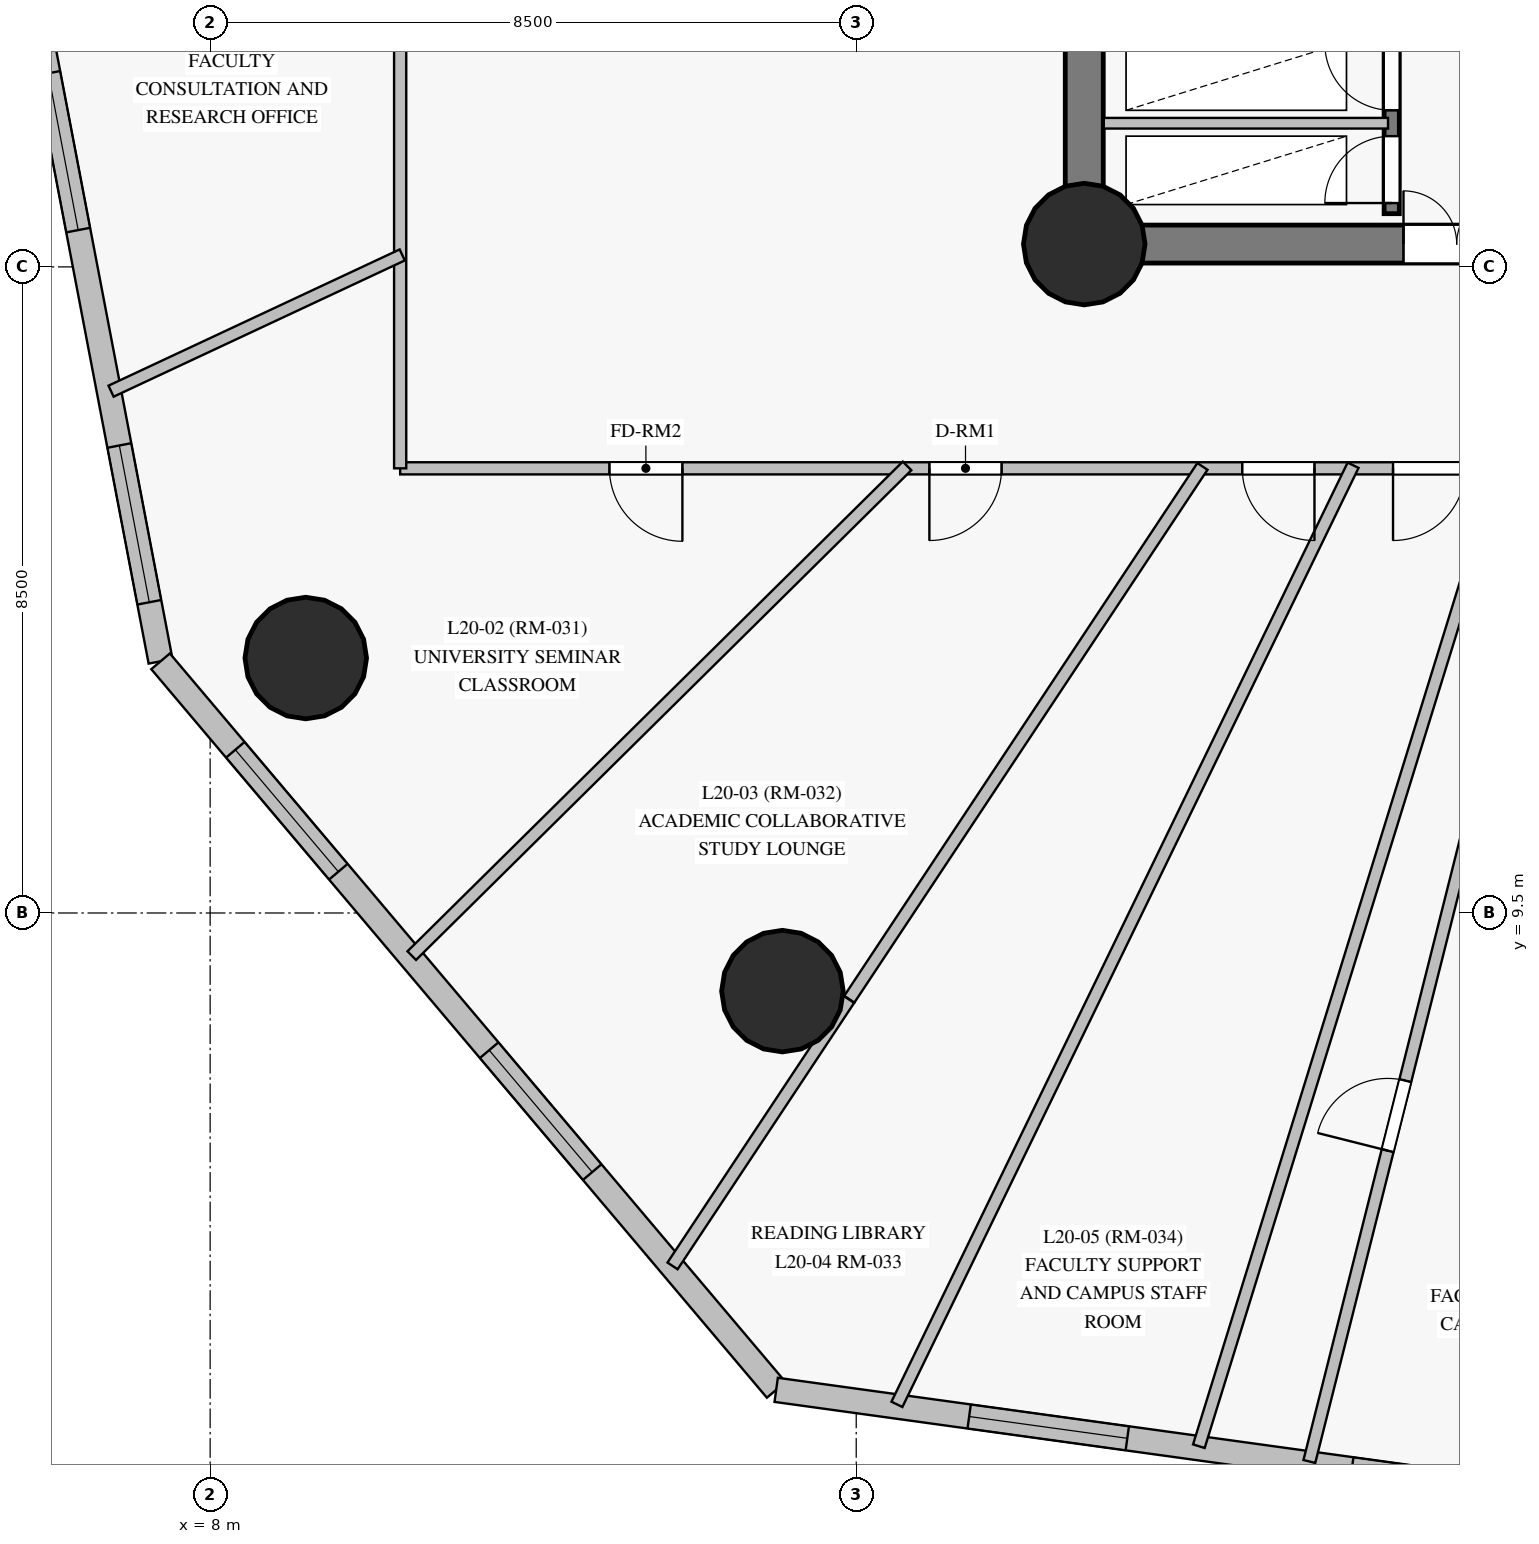
"""IFC4 building model, lengths in metres.
Left out: names, types, materials, properties, quantities, classifications, styles, units other than length and angle.
Written with IfcOpenShell. Run it as: python <this file> out.ifc"""

import sys

from ifc_helpers import new_model, si_unit, direction, frame, frame_2d, origin, origin_with_axes, origin_2d, place, context, subcontext, project, spatial, rectangle, circle, extrude, source, transform, mapped, element, fill, save


model = new_model("IFC4")
c1 = context("Model", 3, precision=1e-05, world=origin(), true_north=direction((0.0, 1.0)))
c2 = subcontext(c1, "Body", "Model", "MODEL_VIEW")
j1 = project(units=[si_unit("LENGTHUNIT", "METRE"), si_unit("PLANEANGLEUNIT", "RADIAN")], contexts=[c1])
p1 = place(None, origin())
s1 = spatial("IfcSite", under=j1, at=p1, CompositionType="ELEMENT")
p2 = place(p1, origin())
s2 = spatial("IfcBuilding", under=s1, at=p2, CompositionType="ELEMENT")
p3 = place(p2, frame((0.0, 0.0, 76.9)))
s3 = spatial("IfcBuildingStorey", under=s2, at=p3, CompositionType="ELEMENT", Elevation=76.9)
p4 = place(p3, frame((19.5, 18.3, 0.0), z_axis=(0.0, 0.0, 1.0), x_axis=(1.0, 0.0, 0.0)))
e1 = element("IfcWall", 1, at=p4, inside=s3, PredefinedType="SHEAR", context=c2, shape_type="SweptSolid", body=[
    extrude(rectangle(XDim=7.05, YDim=0.5, at=frame_2d((3.525, 0.0))), origin(), (0.0, 0.0, 1.0), 3.35),
])
p5 = place(p4, frame((4.2, 0.0, 0.0)))
e2 = element("IfcOpeningElement", 2, at=p5, cuts=e1, PredefinedType="OPENING", context=c2, shape_type="SweptSolid", body=[
    extrude(rectangle(XDim=1.4, YDim=2.2, at=frame_2d((0.7, 1.1))), frame((0.0, 0.26, 0.0), z_axis=(0.0, -1.0, 0.0), x_axis=(1.0, 0.0, 0.0)), (0.0, 0.0, 1.0), 0.52),
])
p6 = place(p3, frame((19.5, 34.7, 0.0), z_axis=(0.0, 0.0, 1.0), x_axis=(0.0, -1.0, 0.0)))
e3 = element("IfcWall", 3, at=p6, inside=s3, PredefinedType="SHEAR", context=c2, shape_type="SweptSolid", body=[
    extrude(rectangle(XDim=16.4, YDim=0.5, at=frame_2d((8.2, 0.0))), origin(), (0.0, 0.0, 1.0), 3.35),
])
p7 = place(p6, frame((3.1, 0.0, 0.0)))
e4 = element("IfcOpeningElement", 4, at=p7, cuts=e3, PredefinedType="OPENING", context=c2, shape_type="SweptSolid", body=[
    extrude(rectangle(XDim=1.1, YDim=2.15, at=frame_2d((0.55, 1.075))), frame((0.0, 0.26, 0.0), z_axis=(0.0, -1.0, 0.0), x_axis=(1.0, 0.0, 0.0)), (0.0, 0.0, 1.0), 0.52),
])
m1 = source(origin_with_axes(), c2, "Body", "SweptSolid", [
    extrude(circle(Radius=0.8, at=origin_2d()), origin(), (0.0, 0.0, 1.0), 3.6),
])
for number, where, z_axis, x_axis in (
    (5, (19.5, 18.3, 0.0), (0.0, 0.0, 1.0), (1.0, 0.0, 0.0)),
    (6, (9.258, 12.854, 0.0), (0.0, 0.0, 1.0), (1.0, 0.0, 0.0)),
    (7, (15.529, 8.472, 0.0), (0.0, 0.0, 1.0), (1.0, 0.0, 0.0)),
):
    element("IfcColumn", number, at=place(p3, frame(where, z_axis=z_axis, x_axis=x_axis)), inside=s3, PredefinedType="COLUMN", context=c2, shape_type="MappedRepresentation", body=[
        mapped(m1, transform((0.0, 0.0, 0.0), scale=1.0)),
    ])
p8 = place(p3, frame((5.454, 22.721, 0.0), z_axis=(0.0, 0.0, 1.0), x_axis=(0.187672475232, -0.982231664141, 0.0)))
e8 = element("IfcWall", 8, at=p8, inside=s3, PredefinedType="SOLIDWALL", context=c2, shape_type="SweptSolid", body=[
    extrude(rectangle(XDim=10.09, YDim=0.32, at=frame_2d((5.045, 0.0))), origin(), (0.0, 0.0, 1.0), 3.35),
])
p9 = place(p8, frame((2.214, 0.0, 0.85)))
e9 = element("IfcOpeningElement", 9, at=p9, cuts=e8, PredefinedType="OPENING", context=c2, shape_type="SweptSolid", body=[
    extrude(rectangle(XDim=2.1, YDim=1.95, at=frame_2d((1.05, 0.975))), frame((0.0, 0.17, 0.0), z_axis=(0.0, -1.0, 0.0), x_axis=(1.0, 0.0, 0.0)), (0.0, 0.0, 1.0), 0.34),
])
p10 = place(p8, frame((7.199, 0.0, 0.85)))
e10 = element("IfcOpeningElement", 10, at=p10, cuts=e8, PredefinedType="OPENING", context=c2, shape_type="SweptSolid", body=[
    extrude(rectangle(XDim=2.1, YDim=1.95, at=frame_2d((1.05, 0.975))), frame((0.0, 0.17, 0.0), z_axis=(0.0, -1.0, 0.0), x_axis=(1.0, 0.0, 0.0)), (0.0, 0.0, 1.0), 0.34),
])
p11 = place(p3, frame((7.348, 12.811, 0.0), z_axis=(0.0, 0.0, 1.0), x_axis=(0.645430137591, -0.76381930945, 0.0)))
e11 = element("IfcWall", 11, at=p11, inside=s3, PredefinedType="SOLIDWALL", context=c2, shape_type="SweptSolid", body=[
    extrude(rectangle(XDim=12.548, YDim=0.32, at=frame_2d((6.274, 0.0))), origin(), (0.0, 0.0, 1.0), 3.35),
])
p12 = place(p11, frame((1.524, 0.0, 0.85)))
e12 = element("IfcOpeningElement", 12, at=p12, cuts=e11, PredefinedType="OPENING", context=c2, shape_type="SweptSolid", body=[
    extrude(rectangle(XDim=2.1, YDim=1.95, at=frame_2d((1.05, 0.975))), frame((0.0, 0.17, 0.0), z_axis=(0.0, -1.0, 0.0), x_axis=(1.0, 0.0, 0.0)), (0.0, 0.0, 1.0), 0.34),
])
p13 = place(p11, frame((6.698, 0.0, 0.85)))
e13 = element("IfcOpeningElement", 13, at=p13, cuts=e11, PredefinedType="OPENING", context=c2, shape_type="SweptSolid", body=[
    extrude(rectangle(XDim=2.1, YDim=1.95, at=frame_2d((1.05, 0.975))), frame((0.0, 0.17, 0.0), z_axis=(0.0, -1.0, 0.0), x_axis=(1.0, 0.0, 0.0)), (0.0, 0.0, 1.0), 0.34),
])
p14 = place(p3, frame((15.447, 3.226, 0.0), z_axis=(0.0, 0.0, 1.0), x_axis=(0.990613318008, -0.136694016636, 0.0)))
e14 = element("IfcWall", 14, at=p14, inside=s3, PredefinedType="SOLIDWALL", context=c2, shape_type="SweptSolid", body=[
    extrude(rectangle(XDim=10.068, YDim=0.32, at=frame_2d((5.034, 0.0))), origin(), (0.0, 0.0, 1.0), 3.35),
])
p15 = place(p14, frame((2.563, 0.0, 0.85)))
e15 = element("IfcOpeningElement", 15, at=p15, cuts=e14, PredefinedType="OPENING", context=c2, shape_type="SweptSolid", body=[
    extrude(rectangle(XDim=2.1, YDim=1.95, at=frame_2d((1.05, 0.975))), frame((0.0, 0.17, 0.0), z_axis=(0.0, -1.0, 0.0), x_axis=(1.0, 0.0, 0.0)), (0.0, 0.0, 1.0), 0.34),
])
p16 = place(p14, frame((7.645, 0.0, 0.85)))
e16 = element("IfcOpeningElement", 16, at=p16, cuts=e14, PredefinedType="OPENING", context=c2, shape_type="SweptSolid", body=[
    extrude(rectangle(XDim=1.8, YDim=1.85, at=frame_2d((0.9, 0.925))), frame((0.0, 0.17, 0.0), z_axis=(0.0, -1.0, 0.0), x_axis=(1.0, 0.0, 0.0)), (0.0, 0.0, 1.0), 0.34),
])
p17 = place(p3, frame((23.545, 18.7, 0.0), z_axis=(0.0, 0.0, 1.0), x_axis=(0.0, 1.0, 0.0)))
e17 = element("IfcWall", 17, at=p17, inside=s3, PredefinedType="SHEAR", context=c2, shape_type="SweptSolid", body=[
    extrude(rectangle(XDim=15.6, YDim=0.2, at=frame_2d((7.8, 0.0))), origin(), (0.0, 0.0, 1.0), 3.35),
])
p18 = place(p17, frame((2.75, 0.0, 0.0)))
e18 = element("IfcOpeningElement", 18, at=p18, cuts=e17, PredefinedType="OPENING", context=c2, shape_type="SweptSolid", body=[
    extrude(rectangle(XDim=1.15, YDim=2.15, at=frame_2d((0.575, 1.075))), frame((0.0, 0.11, 0.0), z_axis=(0.0, -1.0, 0.0), x_axis=(1.0, 0.0, 0.0)), (0.0, 0.0, 1.0), 0.22),
])
p19 = place(p17, frame((0.14, 0.0, 0.0)))
e19 = element("IfcOpeningElement", 19, at=p19, cuts=e17, PredefinedType="OPENING", context=c2, shape_type="SweptSolid", body=[
    extrude(rectangle(XDim=0.88, YDim=2.1, at=frame_2d((0.44, 1.05))), frame((0.0, 0.11, 0.0), z_axis=(0.0, -1.0, 0.0), x_axis=(1.0, 0.0, 0.0)), (0.0, 0.0, 1.0), 0.22),
])
p20 = place(p17, frame((1.36, 0.0, 0.0)))
e20 = element("IfcOpeningElement", 20, at=p20, cuts=e17, PredefinedType="OPENING", context=c2, shape_type="SweptSolid", body=[
    extrude(rectangle(XDim=0.88, YDim=2.1, at=frame_2d((0.44, 1.05))), frame((0.0, 0.11, 0.0), z_axis=(0.0, -1.0, 0.0), x_axis=(1.0, 0.0, 0.0)), (0.0, 0.0, 1.0), 0.22),
])
p21 = place(p17, frame((12.1, 0.0, 0.0)))
e21 = element("IfcOpeningElement", 21, at=p21, cuts=e17, PredefinedType="OPENING", context=c2, shape_type="SweptSolid", body=[
    extrude(rectangle(XDim=1.12, YDim=2.15, at=frame_2d((0.56, 1.075))), frame((0.0, 0.11, 0.0), z_axis=(0.0, -1.0, 0.0), x_axis=(1.0, 0.0, 0.0)), (0.0, 0.0, 1.0), 0.22),
])
p22 = place(p17, frame((14.05, 0.0, 0.0)))
e22 = element("IfcOpeningElement", 22, at=p22, cuts=e17, PredefinedType="OPENING", context=c2, shape_type="SweptSolid", body=[
    extrude(rectangle(XDim=1.12, YDim=2.15, at=frame_2d((0.56, 1.075))), frame((0.0, 0.11, 0.0), z_axis=(0.0, -1.0, 0.0), x_axis=(1.0, 0.0, 0.0)), (0.0, 0.0, 1.0), 0.22),
])
p23 = place(p3, frame((40.25, 15.35, 0.0), z_axis=(0.0, 0.0, 1.0), x_axis=(-1.0, 0.0, 0.0)))
e23 = element("IfcWall", 23, at=p23, inside=s3, PredefinedType="PARTITIONING", context=c2, shape_type="SweptSolid", body=[
    extrude(rectangle(XDim=29.75, YDim=0.16, at=frame_2d((14.875, 0.0))), origin(), (0.0, 0.0, 1.0), 2.7),
])
p24 = place(p23, frame((26.037, 0.0, 0.0)))
e24 = element("IfcOpeningElement", 24, at=p24, cuts=e23, PredefinedType="OPENING", context=c2, shape_type="SweptSolid", body=[
    extrude(rectangle(XDim=0.96, YDim=2.15, at=frame_2d((0.48, 1.075))), frame((0.0, 0.09, 0.0), z_axis=(0.0, -1.0, 0.0), x_axis=(1.0, 0.0, 0.0)), (0.0, 0.0, 1.0), 0.18),
])
p25 = place(p23, frame((21.837, 0.0, 0.0)))
e25 = element("IfcOpeningElement", 25, at=p25, cuts=e23, PredefinedType="OPENING", context=c2, shape_type="SweptSolid", body=[
    extrude(rectangle(XDim=0.95, YDim=2.15, at=frame_2d((0.475, 1.075))), frame((0.0, 0.09, 0.0), z_axis=(0.0, -1.0, 0.0), x_axis=(1.0, 0.0, 0.0)), (0.0, 0.0, 1.0), 0.18),
])
p26 = place(p23, frame((17.721, 0.0, 0.0)))
e26 = element("IfcOpeningElement", 26, at=p26, cuts=e23, PredefinedType="OPENING", context=c2, shape_type="SweptSolid", body=[
    extrude(rectangle(XDim=0.95, YDim=2.15, at=frame_2d((0.475, 1.075))), frame((0.0, 0.09, 0.0), z_axis=(0.0, -1.0, 0.0), x_axis=(1.0, 0.0, 0.0)), (0.0, 0.0, 1.0), 0.18),
])
p27 = place(p23, frame((15.738, 0.0, 0.0)))
e27 = element("IfcOpeningElement", 27, at=p27, cuts=e23, PredefinedType="OPENING", context=c2, shape_type="SweptSolid", body=[
    extrude(rectangle(XDim=0.95, YDim=2.15, at=frame_2d((0.475, 1.075))), frame((0.0, 0.09, 0.0), z_axis=(0.0, -1.0, 0.0), x_axis=(1.0, 0.0, 0.0)), (0.0, 0.0, 1.0), 0.18),
])
p28 = place(p23, frame((14.06, 0.0, 0.0)))
e28 = element("IfcOpeningElement", 28, at=p28, cuts=e23, PredefinedType="OPENING", context=c2, shape_type="SweptSolid", body=[
    extrude(rectangle(XDim=0.95, YDim=2.15, at=frame_2d((0.475, 1.075))), frame((0.0, 0.09, 0.0), z_axis=(0.0, -1.0, 0.0), x_axis=(1.0, 0.0, 0.0)), (0.0, 0.0, 1.0), 0.18),
])
p29 = place(p23, frame((2.16, 0.0, 0.0)))
e29 = element("IfcOpeningElement", 29, at=p29, cuts=e23, PredefinedType="OPENING", context=c2, shape_type="SweptSolid", body=[
    extrude(rectangle(XDim=0.95, YDim=2.15, at=frame_2d((0.475, 1.075))), frame((0.0, 0.09, 0.0), z_axis=(0.0, -1.0, 0.0), x_axis=(1.0, 0.0, 0.0)), (0.0, 0.0, 1.0), 0.18),
])
p30 = place(p3, frame((10.5, 15.35, 0.0), z_axis=(0.0, 0.0, 1.0), x_axis=(0.0, 1.0, 0.0)))
e30 = element("IfcWall", 30, at=p30, inside=s3, PredefinedType="PARTITIONING", context=c2, shape_type="SweptSolid", body=[
    extrude(rectangle(XDim=22.3, YDim=0.16, at=frame_2d((11.15, 0.0))), origin(), (0.0, 0.0, 1.0), 2.75),
])
p31 = place(p30, frame((7.33, 0.0, 0.0)))
e31 = element("IfcOpeningElement", 31, at=p31, cuts=e30, PredefinedType="OPENING", context=c2, shape_type="SweptSolid", body=[
    extrude(rectangle(XDim=0.95, YDim=2.15, at=frame_2d((0.475, 1.075))), frame((0.0, 0.09, 0.0), z_axis=(0.0, -1.0, 0.0), x_axis=(1.0, 0.0, 0.0)), (0.0, 0.0, 1.0), 0.18),
])
p32 = place(p30, frame((10.675, 0.0, 0.0)))
e32 = element("IfcOpeningElement", 32, at=p32, cuts=e30, PredefinedType="OPENING", context=c2, shape_type="SweptSolid", body=[
    extrude(rectangle(XDim=0.95, YDim=2.15, at=frame_2d((0.475, 1.075))), frame((0.0, 0.09, 0.0), z_axis=(0.0, -1.0, 0.0), x_axis=(1.0, 0.0, 0.0)), (0.0, 0.0, 1.0), 0.18),
])
p33 = place(p3, frame((23.037, 15.39, 0.0), z_axis=(0.0, 0.0, 1.0), x_axis=(-0.436938889673, -0.899491193226, 0.0)))
e33 = element("IfcWall", 33, at=p33, inside=s3, PredefinedType="PARTITIONING", context=c2, shape_type="SweptSolid", body=[
    extrude(rectangle(XDim=13.735, YDim=0.16, at=frame_2d((6.868, 0.0))), origin(), (0.0, 0.0, 1.0), 3.35),
])
p34 = place(p3, frame((25.001, 15.393, 0.0), z_axis=(0.0, 0.0, 1.0), x_axis=(-0.29553806887, -0.955330963514, 0.0)))
e34 = element("IfcWall", 34, at=p34, inside=s3, PredefinedType="PARTITIONING", context=c2, shape_type="SweptSolid", body=[
    extrude(rectangle(XDim=13.511, YDim=0.16, at=frame_2d((6.756, 0.0))), origin(), (0.0, 0.0, 1.0), 3.35),
])
p35 = place(p3, frame((22.461, 2.284, 0.0), z_axis=(0.0, 0.0, 1.0), x_axis=(0.244291469889, 0.969701849921, 0.0)))
e35 = element("IfcWall", 35, at=p35, inside=s3, PredefinedType="PARTITIONING", context=c2, shape_type="SweptSolid", body=[
    extrude(rectangle(XDim=9.42, YDim=0.16, at=frame_2d((4.71, 0.0))), origin(), (0.0, 0.0, 1.0), 3.35),
])
p36 = place(p35, frame((4.218, 0.0, 0.0)))
e36 = element("IfcOpeningElement", 36, at=p36, cuts=e35, PredefinedType="OPENING", context=c2, shape_type="SweptSolid", body=[
    extrude(rectangle(XDim=0.95, YDim=2.15, at=frame_2d((0.475, 1.075))), frame((0.0, 0.09, 0.0), z_axis=(0.0, -1.0, 0.0), x_axis=(1.0, 0.0, 0.0)), (0.0, 0.0, 1.0), 0.18),
])
p37 = place(p3, frame((17.169, 15.382, 0.0), z_axis=(0.0, 0.0, 1.0), x_axis=(-0.711131694036, -0.703058826654, 0.0)))
e37 = element("IfcWall", 37, at=p37, inside=s3, PredefinedType="PARTITIONING", context=c2, shape_type="SweptSolid", body=[
    extrude(rectangle(XDim=9.163, YDim=0.16, at=frame_2d((4.582, 0.0))), origin(), (0.0, 0.0, 1.0), 3.35),
])
p38 = place(p3, frame((21.055, 15.375, 0.0), z_axis=(0.0, 0.0, 1.0), x_axis=(-0.552453765645, -0.833543542248, 0.0)))
e38 = element("IfcWall", 38, at=p38, inside=s3, PredefinedType="PARTITIONING", context=c2, shape_type="SweptSolid", body=[
    extrude(rectangle(XDim=8.409, YDim=0.16, at=frame_2d((4.205, 0.0))), origin(), (0.0, 0.0, 1.0), 3.35),
])
p39 = place(p3, frame((10.527, 18.157, 0.0), z_axis=(0.0, 0.0, 1.0), x_axis=(-0.905772735817, -0.423763791577, 0.0)))
e39 = element("IfcWall", 39, at=p39, inside=s3, PredefinedType="PARTITIONING", context=c2, shape_type="SweptSolid", body=[
    extrude(rectangle(XDim=4.229, YDim=0.16, at=frame_2d((2.115, 0.0))), origin(), (0.0, 0.0, 1.0), 3.35),
])
p40 = place(p3, frame((19.757, 19.89, 0.0), z_axis=(0.0, 0.0, 1.0), x_axis=(1.0, 0.0, 0.0)))
e40 = element("IfcWall", 40, at=p40, inside=s3, PredefinedType="PARTITIONING", context=c2, shape_type="SweptSolid", body=[
    extrude(rectangle(XDim=3.739, YDim=0.14, at=frame_2d((1.87, 0.0))), origin(), (0.0, 0.0, 1.0), 3.35),
])
p41 = place(p3, frame((16.406, 8.361, 0.0), z_axis=(0.0, 0.0, 1.0), x_axis=(-0.552446963092, -0.833548050787, 0.0)))
e41 = element("IfcWall", 41, at=p41, inside=s3, PredefinedType="PARTITIONING", context=c2, shape_type="SweptSolid", body=[
    extrude(rectangle(XDim=4.205, YDim=0.16, at=frame_2d((2.102, 0.0))), origin(), (0.0, 0.0, 1.0), 3.35),
])
m2 = source(origin_with_axes(), c2, "Body", "SweptSolid", [
    extrude(rectangle(XDim=2.1, YDim=1.95, at=frame_2d((1.05, 0.975))), frame((0.0, 0.03, 0.0), z_axis=(0.0, -1.0, 0.0), x_axis=(1.0, 0.0, 0.0)), (0.0, 0.0, 1.0), 0.06),
])
p42 = place(p9, origin())
e42 = element("IfcWindow", 42, at=p42, inside=s3, PartitioningType="SINGLE_PANEL", PredefinedType="WINDOW", context=c2, shape_type="MappedRepresentation", body=[
    mapped(m2, transform((0.0, 0.0, 0.0), scale=1.0)),
])
fill(e9, e42)
p43 = place(p10, origin())
e43 = element("IfcWindow", 43, at=p43, inside=s3, PartitioningType="SINGLE_PANEL", PredefinedType="WINDOW", context=c2, shape_type="MappedRepresentation", body=[
    mapped(m2, transform((0.0, 0.0, 0.0), scale=1.0)),
])
fill(e10, e43)
p44 = place(p12, origin())
e44 = element("IfcWindow", 44, at=p44, inside=s3, PartitioningType="SINGLE_PANEL", PredefinedType="WINDOW", context=c2, shape_type="MappedRepresentation", body=[
    mapped(m2, transform((0.0, 0.0, 0.0), scale=1.0)),
])
fill(e12, e44)
p45 = place(p13, origin())
e45 = element("IfcWindow", 45, at=p45, inside=s3, PartitioningType="SINGLE_PANEL", PredefinedType="WINDOW", context=c2, shape_type="MappedRepresentation", body=[
    mapped(m2, transform((0.0, 0.0, 0.0), scale=1.0)),
])
fill(e13, e45)
p46 = place(p15, origin())
e46 = element("IfcWindow", 46, at=p46, inside=s3, PartitioningType="SINGLE_PANEL", PredefinedType="WINDOW", context=c2, shape_type="MappedRepresentation", body=[
    mapped(m2, transform((0.0, 0.0, 0.0), scale=1.0)),
])
fill(e15, e46)
m3 = source(origin_with_axes(), c2, "Body", "SweptSolid", [
    extrude(rectangle(XDim=0.88, YDim=2.1, at=frame_2d((0.44, 1.05))), frame((0.0, 0.025, 0.0), z_axis=(0.0, -1.0, 0.0), x_axis=(1.0, 0.0, 0.0)), (0.0, 0.0, 1.0), 0.05),
])
p47 = place(p19, origin())
e47 = element("IfcDoor", 47, at=p47, inside=s3, OperationType="SINGLE_SWING_LEFT", PredefinedType="DOOR", context=c2, shape_type="MappedRepresentation", body=[
    mapped(m3, transform((0.0, 0.0, 0.0), scale=1.0)),
])
fill(e19, e47)
p48 = place(p20, origin())
e48 = element("IfcDoor", 48, at=p48, inside=s3, OperationType="SINGLE_SWING_RIGHT", PredefinedType="DOOR", context=c2, shape_type="MappedRepresentation", body=[
    mapped(m3, transform((0.0, 0.0, 0.0), scale=1.0)),
])
fill(e20, e48)
m4 = source(origin_with_axes(), c2, "Body", "SweptSolid", [
    extrude(rectangle(XDim=1.4, YDim=2.2, at=frame_2d((0.7, 1.1))), frame((0.0, 0.025, 0.0), z_axis=(0.0, -1.0, 0.0), x_axis=(1.0, 0.0, 0.0)), (0.0, 0.0, 1.0), 0.05),
])
p49 = place(p5, origin())
e49 = element("IfcDoor", 49, at=p49, inside=s3, OperationType="DOUBLE_DOOR_SINGLE_SWING", PredefinedType="DOOR", context=c2, shape_type="MappedRepresentation", body=[
    mapped(m4, transform((0.0, 0.0, 0.0), scale=1.0)),
])
fill(e2, e49)
m5 = source(origin_with_axes(), c2, "Body", "SweptSolid", [
    extrude(rectangle(XDim=0.96, YDim=2.15, at=frame_2d((0.48, 1.075))), frame((0.0, 0.025, 0.0), z_axis=(0.0, -1.0, 0.0), x_axis=(1.0, 0.0, 0.0)), (0.0, 0.0, 1.0), 0.05),
])
p50 = place(p24, origin())
e50 = element("IfcDoor", 50, at=p50, inside=s3, OperationType="SINGLE_SWING_LEFT", PredefinedType="DOOR", context=c2, shape_type="MappedRepresentation", body=[
    mapped(m5, transform((0.0, 0.0, 0.0), scale=1.0)),
])
fill(e24, e50)
m6 = source(origin_with_axes(), c2, "Body", "SweptSolid", [
    extrude(rectangle(XDim=0.95, YDim=2.15, at=frame_2d((0.475, 1.075))), frame((0.0, 0.025, 0.0), z_axis=(0.0, -1.0, 0.0), x_axis=(1.0, 0.0, 0.0)), (0.0, 0.0, 1.0), 0.05),
])
p51 = place(p25, origin())
e51 = element("IfcDoor", 51, at=p51, inside=s3, OperationType="SINGLE_SWING_RIGHT", PredefinedType="DOOR", context=c2, shape_type="MappedRepresentation", body=[
    mapped(m6, transform((0.0, 0.0, 0.0), scale=1.0)),
])
fill(e25, e51)
p52 = place(p26, origin())
e52 = element("IfcDoor", 52, at=p52, inside=s3, OperationType="SINGLE_SWING_LEFT", PredefinedType="DOOR", context=c2, shape_type="MappedRepresentation", body=[
    mapped(m6, transform((0.0, 0.0, 0.0), scale=1.0)),
])
fill(e26, e52)
p53 = place(p27, origin())
e53 = element("IfcDoor", 53, at=p53, inside=s3, OperationType="SINGLE_SWING_RIGHT", PredefinedType="DOOR", context=c2, shape_type="MappedRepresentation", body=[
    mapped(m6, transform((0.0, 0.0, 0.0), scale=1.0)),
])
fill(e27, e53)
p54 = place(p36, origin())
e54 = element("IfcDoor", 54, at=p54, inside=s3, OperationType="SINGLE_SWING_LEFT", PredefinedType="DOOR", context=c2, shape_type="MappedRepresentation", body=[
    mapped(m6, transform((0.0, 0.0, 0.0), scale=1.0)),
])
fill(e36, e54)
save(model, sys.argv[1])
